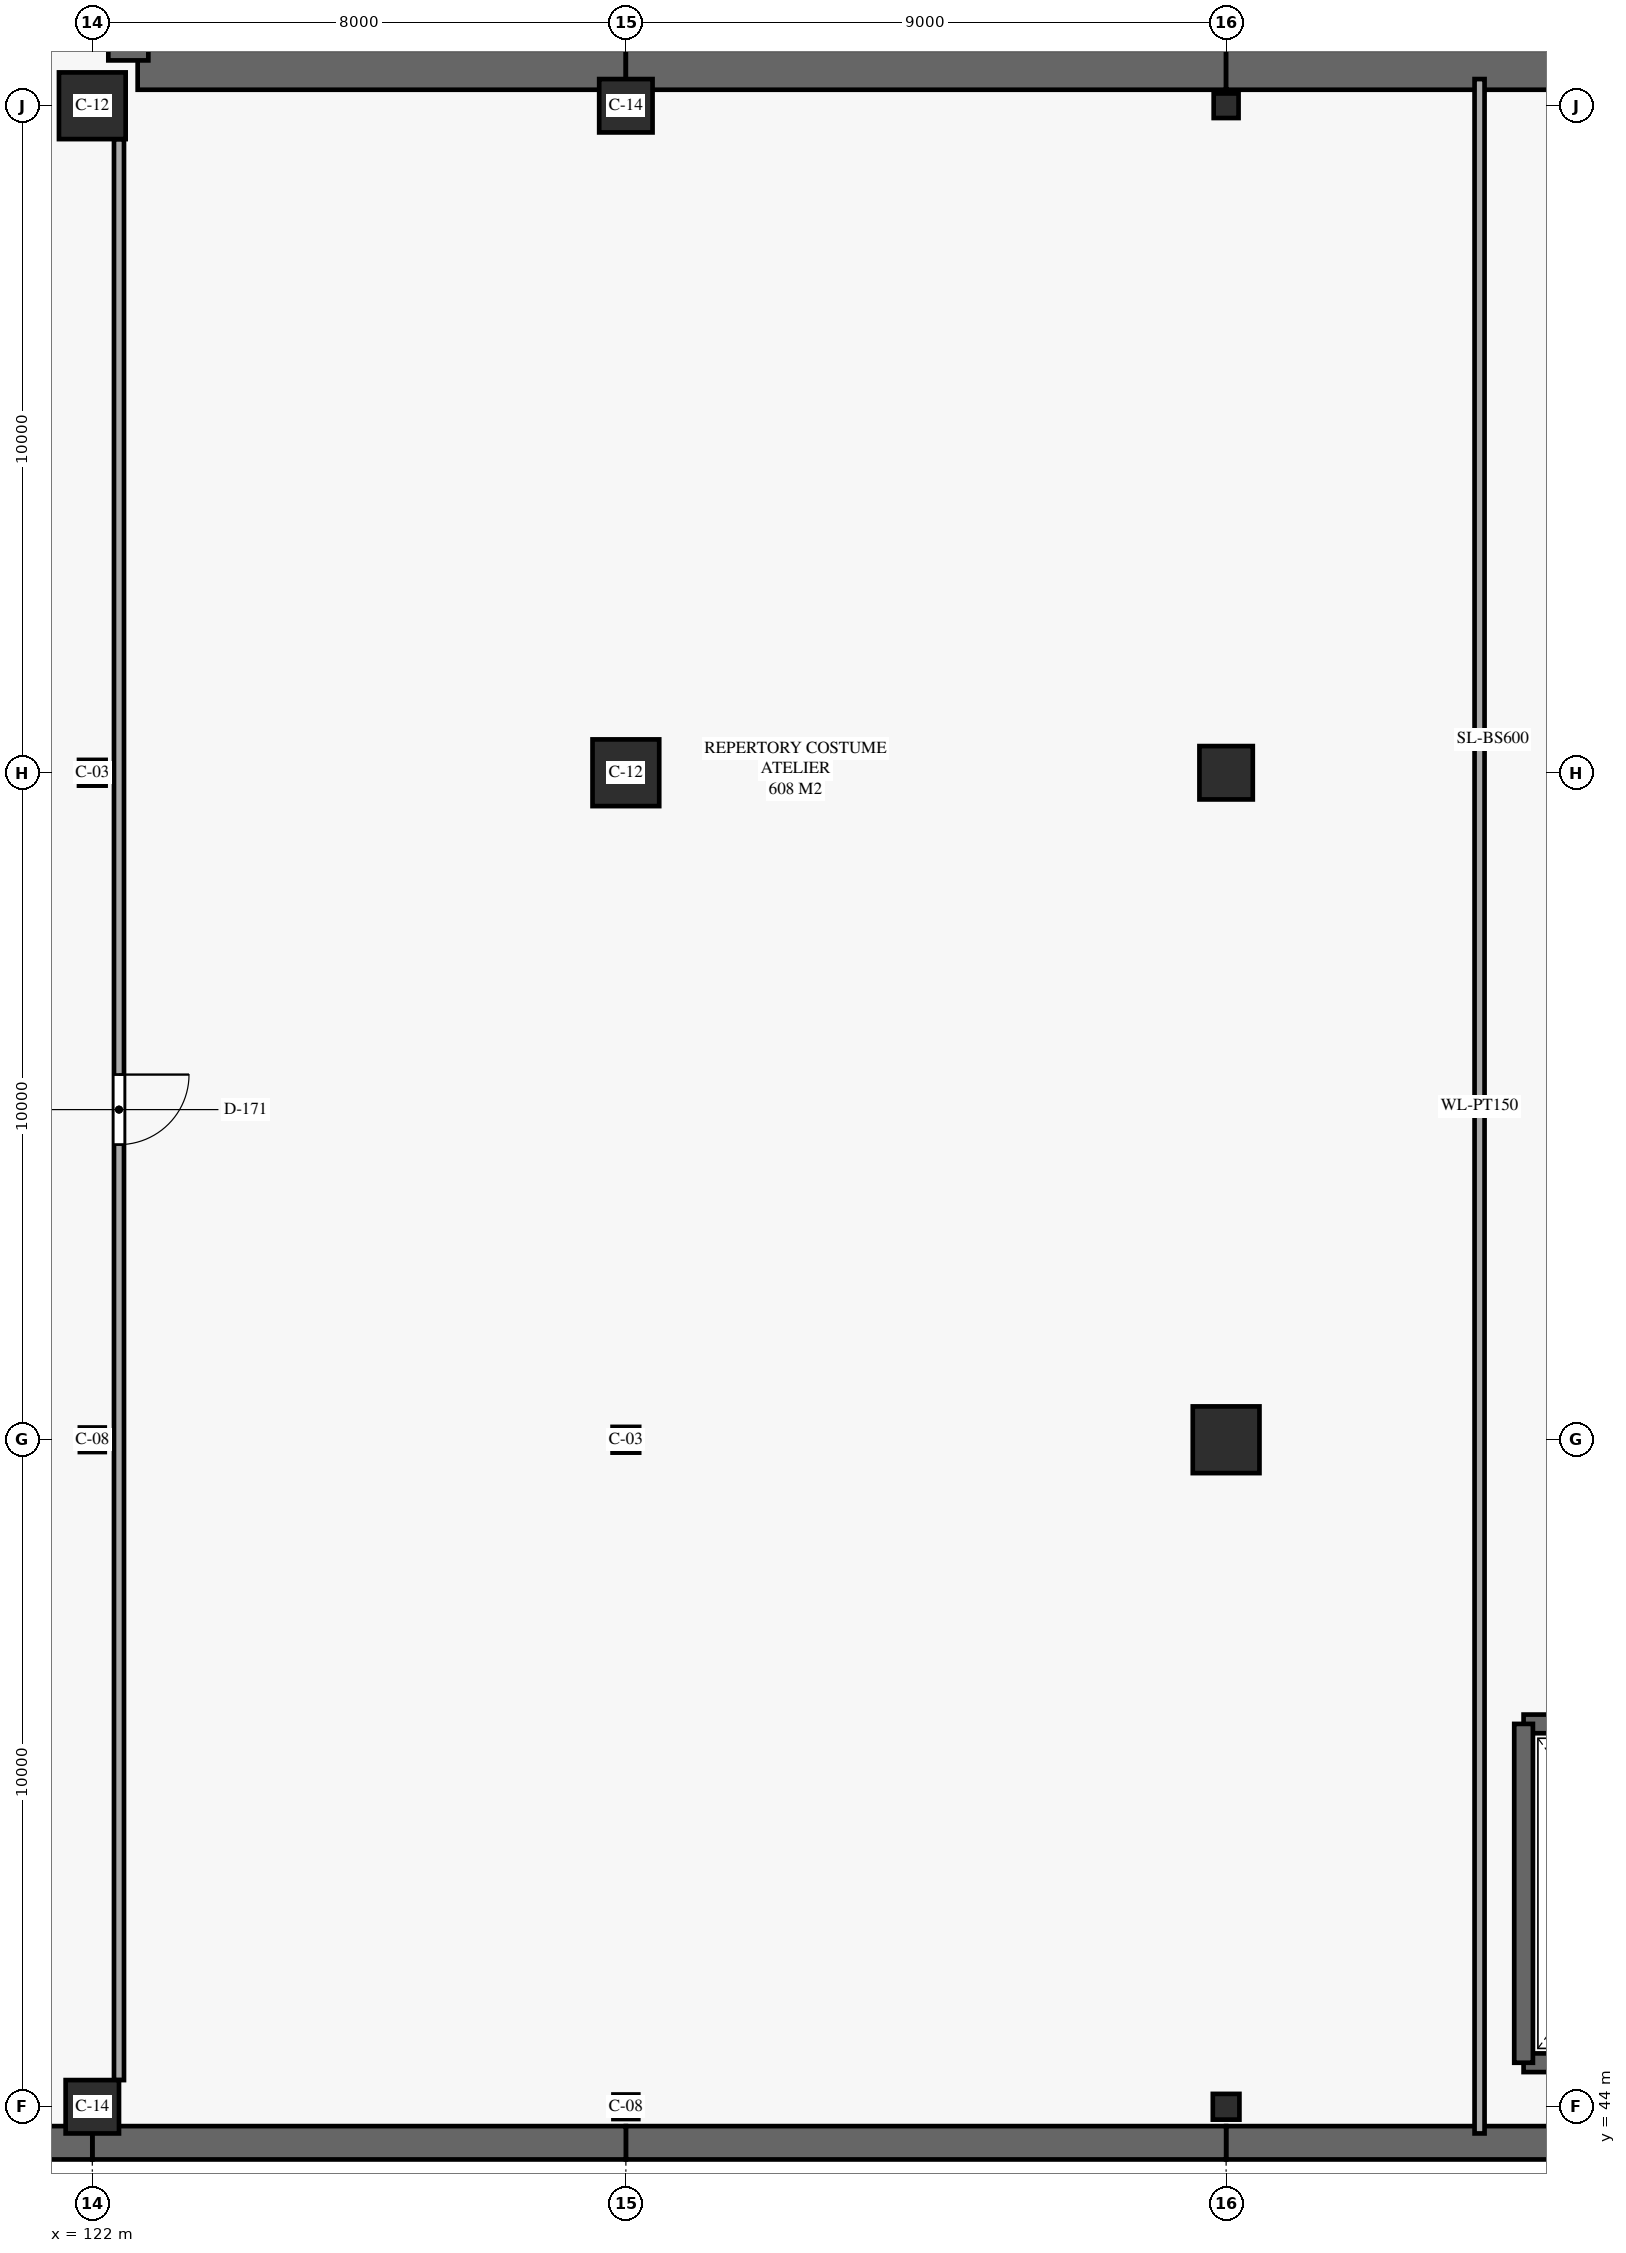
"""IFC4 building model, lengths in metres.
Left out: names, types, materials, properties, quantities, classifications, styles, units other than length and angle.
Written with IfcOpenShell. Run it as: python <this file> out.ifc"""

import sys

from ifc_helpers import new_model, si_unit, direction, frame, frame_2d, origin, origin_2d, place, context, subcontext, project, spatial, rectangle, i_section, extrude, element, fill, save


model = new_model("IFC4")
c1 = context("Model", 3, precision=1e-05, world=origin(), true_north=direction((0.0, 1.0)))
c2 = subcontext(c1, "Body", "Model", "MODEL_VIEW")
j1 = project(units=[si_unit("LENGTHUNIT", "METRE"), si_unit("PLANEANGLEUNIT", "RADIAN")], contexts=[c1])
p1 = place(None, origin())
s1 = spatial("IfcSite", under=j1, at=p1, CompositionType="ELEMENT")
p2 = place(p1, origin())
s2 = spatial("IfcBuilding", under=s1, at=p2, CompositionType="ELEMENT")
p3 = place(p2, frame((0.0, 0.0, -5.4)))
s3 = spatial("IfcBuildingStorey", under=s2, at=p3, CompositionType="ELEMENT", Elevation=-5.4)
p4 = place(p3, frame((122.0, 44.0, -0.6), z_axis=(0.0, 0.0, 1.0), x_axis=(1.0, 0.0, 0.0)))
e1 = element("IfcColumn", 1, at=p4, inside=s3, PredefinedType="COLUMN", context=c2, shape_type="SweptSolid", body=[
    extrude(rectangle(XDim=0.8, YDim=0.8, at=origin_2d()), origin(), (0.0, 0.0, 1.0), 6.0),
])
p5 = place(p3, frame((122.0, 54.0, -0.6), z_axis=(0.0, 0.0, 1.0), x_axis=(1.0, 0.0, 0.0)))
e2 = element("IfcColumn", 2, at=p5, inside=s3, PredefinedType="COLUMN", context=c2, shape_type="SweptSolid", body=[
    extrude(i_section(OverallWidth=0.373, OverallDepth=0.368, WebThickness=0.015, FlangeThickness=0.024, FilletRadius=0.015, at=origin_2d()), origin(), (0.0, 0.0, 1.0), 6.0),
])
p6 = place(p3, frame((122.0, 64.0, -0.6), z_axis=(0.0, 0.0, 1.0), x_axis=(1.0, 0.0, 0.0)))
e3 = element("IfcColumn", 3, at=p6, inside=s3, PredefinedType="COLUMN", context=c2, shape_type="SweptSolid", body=[
    extrude(i_section(OverallWidth=0.399, OverallDepth=0.386, WebThickness=0.021, FlangeThickness=0.033, FilletRadius=0.016, at=origin_2d()), origin(), (0.0, 0.0, 1.0), 6.0),
])
p7 = place(p3, frame((122.0, 74.0, -0.6), z_axis=(0.0, 0.0, 1.0), x_axis=(1.0, 0.0, 0.0)))
e4 = element("IfcColumn", 4, at=p7, inside=s3, PredefinedType="COLUMN", context=c2, shape_type="SweptSolid", body=[
    extrude(rectangle(XDim=1.0, YDim=1.0, at=origin_2d()), origin(), (0.0, 0.0, 1.0), 6.0),
])
p8 = place(p3, frame((130.0, 44.0, -0.6), z_axis=(0.0, 0.0, 1.0), x_axis=(1.0, 0.0, 0.0)))
e5 = element("IfcColumn", 5, at=p8, inside=s3, PredefinedType="COLUMN", context=c2, shape_type="SweptSolid", body=[
    extrude(i_section(OverallWidth=0.373, OverallDepth=0.368, WebThickness=0.015, FlangeThickness=0.024, FilletRadius=0.015, at=origin_2d()), origin(), (0.0, 0.0, 1.0), 6.0),
])
p9 = place(p3, frame((130.0, 54.0, -0.6), z_axis=(0.0, 0.0, 1.0), x_axis=(1.0, 0.0, 0.0)))
e6 = element("IfcColumn", 6, at=p9, inside=s3, PredefinedType="COLUMN", context=c2, shape_type="SweptSolid", body=[
    extrude(i_section(OverallWidth=0.399, OverallDepth=0.386, WebThickness=0.021, FlangeThickness=0.033, FilletRadius=0.016, at=origin_2d()), origin(), (0.0, 0.0, 1.0), 6.0),
])
p10 = place(p3, frame((130.0, 64.0, -0.6), z_axis=(0.0, 0.0, 1.0), x_axis=(1.0, 0.0, 0.0)))
e7 = element("IfcColumn", 7, at=p10, inside=s3, PredefinedType="COLUMN", context=c2, shape_type="SweptSolid", body=[
    extrude(rectangle(XDim=1.0, YDim=1.0, at=origin_2d()), origin(), (0.0, 0.0, 1.0), 6.0),
])
p11 = place(p3, frame((130.0, 74.0, -0.6), z_axis=(0.0, 0.0, 1.0), x_axis=(1.0, 0.0, 0.0)))
e8 = element("IfcColumn", 8, at=p11, inside=s3, PredefinedType="COLUMN", context=c2, shape_type="SweptSolid", body=[
    extrude(rectangle(XDim=0.8, YDim=0.8, at=origin_2d()), origin(), (0.0, 0.0, 1.0), 6.0),
])
p12 = place(p3, frame((139.0, 44.0, -0.6), z_axis=(0.0, 0.0, 1.0), x_axis=(1.0, 0.0, 0.0)))
e9 = element("IfcColumn", 9, at=p12, inside=s3, PredefinedType="COLUMN", context=c2, shape_type="SweptSolid", body=[
    extrude(i_section(OverallWidth=0.399, OverallDepth=0.386, WebThickness=0.021, FlangeThickness=0.033, FilletRadius=0.016, at=origin_2d()), origin(), (0.0, 0.0, 1.0), 6.0),
])
p13 = place(p3, frame((139.0, 54.0, -0.6), z_axis=(0.0, 0.0, 1.0), x_axis=(1.0, 0.0, 0.0)))
e10 = element("IfcColumn", 10, at=p13, inside=s3, PredefinedType="COLUMN", context=c2, shape_type="SweptSolid", body=[
    extrude(rectangle(XDim=1.0, YDim=1.0, at=origin_2d()), origin(), (0.0, 0.0, 1.0), 6.0),
])
p14 = place(p3, frame((139.0, 64.0, -0.6), z_axis=(0.0, 0.0, 1.0), x_axis=(1.0, 0.0, 0.0)))
e11 = element("IfcColumn", 11, at=p14, inside=s3, PredefinedType="COLUMN", context=c2, shape_type="SweptSolid", body=[
    extrude(rectangle(XDim=0.8, YDim=0.8, at=origin_2d()), origin(), (0.0, 0.0, 1.0), 6.0),
])
p15 = place(p3, frame((139.0, 74.0, -0.6), z_axis=(0.0, 0.0, 1.0), x_axis=(1.0, 0.0, 0.0)))
e12 = element("IfcColumn", 12, at=p15, inside=s3, PredefinedType="COLUMN", context=c2, shape_type="SweptSolid", body=[
    extrude(i_section(OverallWidth=0.373, OverallDepth=0.368, WebThickness=0.015, FlangeThickness=0.024, FilletRadius=0.015, at=origin_2d()), origin(), (0.0, 0.0, 1.0), 6.0),
])
for number, where, z_axis, x_axis in (
    (13, (143.46, 44.66, 0.0), (0.0, 0.0, 1.0), (1.0, 0.0, 0.0)),
    (14, (147.34, 49.74, 0.0), (0.0, 0.0, 1.0), (-1.0, 0.0, 0.0)),
):
    element("IfcWall", number, at=place(p3, frame(where, z_axis=z_axis, x_axis=x_axis)), inside=s3, PredefinedType="SHEAR", context=c2, shape_type="SweptSolid", body=[
        extrude(rectangle(XDim=3.88, YDim=0.28, at=frame_2d((1.94, 0.0))), origin(), (0.0, 0.0, 1.0), 5.02),
    ])
p16 = place(p3, frame((143.46, 49.74, 0.0), z_axis=(0.0, 0.0, 1.0), x_axis=(0.0, -1.0, 0.0)))
e15 = element("IfcWall", 15, at=p16, inside=s3, PredefinedType="SHEAR", context=c2, shape_type="SweptSolid", body=[
    extrude(rectangle(XDim=5.08, YDim=0.28, at=frame_2d((2.54, 0.0))), origin(), (0.0, 0.0, 1.0), 5.02),
])
for number, where, z_axis, x_axis in (
    (16, (148.0, 43.46, 0.0), (0.0, 0.0, 1.0), (-1.0, 0.0, 0.0)),
    (17, (139.0, 43.46, 0.0), (0.0, 0.0, 1.0), (-1.0, 0.0, 0.0)),
):
    element("IfcWall", number, at=place(p3, frame(where, z_axis=z_axis, x_axis=x_axis)), inside=s3, PredefinedType="USERDEFINED", context=c2, shape_type="SweptSolid", body=[
        extrude(rectangle(XDim=9.0, YDim=0.5, at=frame_2d((4.5, 0.0))), origin(), (0.0, 0.0, 1.0), 5.02),
    ])
p17 = place(p3, frame((130.0, 43.46, 0.0), z_axis=(0.0, 0.0, 1.0), x_axis=(-1.0, 0.0, 0.0)))
e18 = element("IfcWall", 18, at=p17, inside=s3, PredefinedType="USERDEFINED", context=c2, shape_type="SweptSolid", body=[
    extrude(rectangle(XDim=8.0, YDim=0.5, at=frame_2d((4.0, 0.0))), origin(), (0.0, 0.0, 1.0), 5.02),
])
p18 = place(p3, frame((122.0, 43.46, 0.0), z_axis=(0.0, 0.0, 1.0), x_axis=(-1.0, 0.0, 0.0)))
e19 = element("IfcWall", 19, at=p18, inside=s3, PredefinedType="USERDEFINED", context=c2, shape_type="SweptSolid", body=[
    extrude(rectangle(XDim=7.32, YDim=0.5, at=frame_2d((3.66, 0.0))), origin(), (0.0, 0.0, 1.0), 5.02),
])
p19 = place(p3, frame((122.68, 74.54, 0.0), z_axis=(0.0, 0.0, 1.0), x_axis=(1.0, 0.0, 0.0)))
e20 = element("IfcWall", 20, at=p19, inside=s3, PredefinedType="USERDEFINED", context=c2, shape_type="SweptSolid", body=[
    extrude(rectangle(XDim=7.32, YDim=0.6, at=frame_2d((3.66, 0.0))), origin(), (0.0, 0.0, 1.0), 5.02),
])
p20 = place(p3, frame((130.0, 74.54, 0.0), z_axis=(0.0, 0.0, 1.0), x_axis=(1.0, 0.0, 0.0)))
e21 = element("IfcWall", 21, at=p20, inside=s3, PredefinedType="USERDEFINED", context=c2, shape_type="SweptSolid", body=[
    extrude(rectangle(XDim=9.0, YDim=0.6, at=frame_2d((4.5, 0.0))), origin(), (0.0, 0.0, 1.0), 5.02),
])
p21 = place(p3, frame((139.0, 74.54, 0.0), z_axis=(0.0, 0.0, 1.0), x_axis=(1.0, 0.0, 0.0)))
e22 = element("IfcWall", 22, at=p21, inside=s3, PredefinedType="USERDEFINED", context=c2, shape_type="SweptSolid", body=[
    extrude(rectangle(XDim=8.32, YDim=0.6, at=frame_2d((4.16, 0.0))), origin(), (0.0, 0.0, 1.0), 5.02),
])
p22 = place(p3, frame((122.54, 84.0, 0.0), z_axis=(0.0, 0.0, 1.0), x_axis=(0.0, -1.0, 0.0)))
e23 = element("IfcWall", 23, at=p22, inside=s3, PredefinedType="USERDEFINED", context=c2, shape_type="SweptSolid", body=[
    extrude(rectangle(XDim=9.32, YDim=0.6, at=frame_2d((4.66, 0.0))), origin(), (0.0, 0.0, 1.0), 5.02),
])
p23 = place(p3, frame((122.4, 73.5, 0.0), z_axis=(0.0, 0.0, 1.0), x_axis=(0.0, -1.0, 0.0)))
e24 = element("IfcWall", 24, at=p23, inside=s3, PredefinedType="PARTITIONING", context=c2, shape_type="SweptSolid", body=[
    extrude(rectangle(XDim=29.1, YDim=0.15, at=frame_2d((14.55, 0.0))), origin(), (0.0, 0.0, 1.0), 4.21),
])
p24 = place(p23, frame((14.025, 0.0, 0.0)))
e25 = element("IfcOpeningElement", 25, at=p24, cuts=e24, PredefinedType="OPENING", context=c2, shape_type="SweptSolid", body=[
    extrude(rectangle(XDim=1.05, YDim=2.2, at=frame_2d((0.525, 1.1))), frame((0.0, 0.085, 0.0), z_axis=(0.0, -1.0, 0.0), x_axis=(1.0, 0.0, 0.0)), (0.0, 0.0, 1.0), 0.17),
])
p25 = place(p3, frame((142.8, 43.6, 0.0), z_axis=(0.0, 0.0, 1.0), x_axis=(0.0, 1.0, 0.0)))
e26 = element("IfcWall", 26, at=p25, inside=s3, PredefinedType="PARTITIONING", context=c2, shape_type="SweptSolid", body=[
    extrude(rectangle(XDim=30.8, YDim=0.15, at=frame_2d((15.4, 0.0))), origin(), (0.0, 0.0, 1.0), 5.02),
])
p26 = place(p24, origin())
e27 = element("IfcDoor", 27, at=p26, inside=s3, OperationType="SINGLE_SWING_LEFT", PredefinedType="DOOR", context=c2, shape_type="SweptSolid", body=[
    extrude(rectangle(XDim=1.05, YDim=2.2, at=frame_2d((0.525, 1.1))), frame((0.0, 0.025, 0.0), z_axis=(0.0, -1.0, 0.0), x_axis=(1.0, 0.0, 0.0)), (0.0, 0.0, 1.0), 0.05),
])
fill(e25, e27)
save(model, sys.argv[1])
